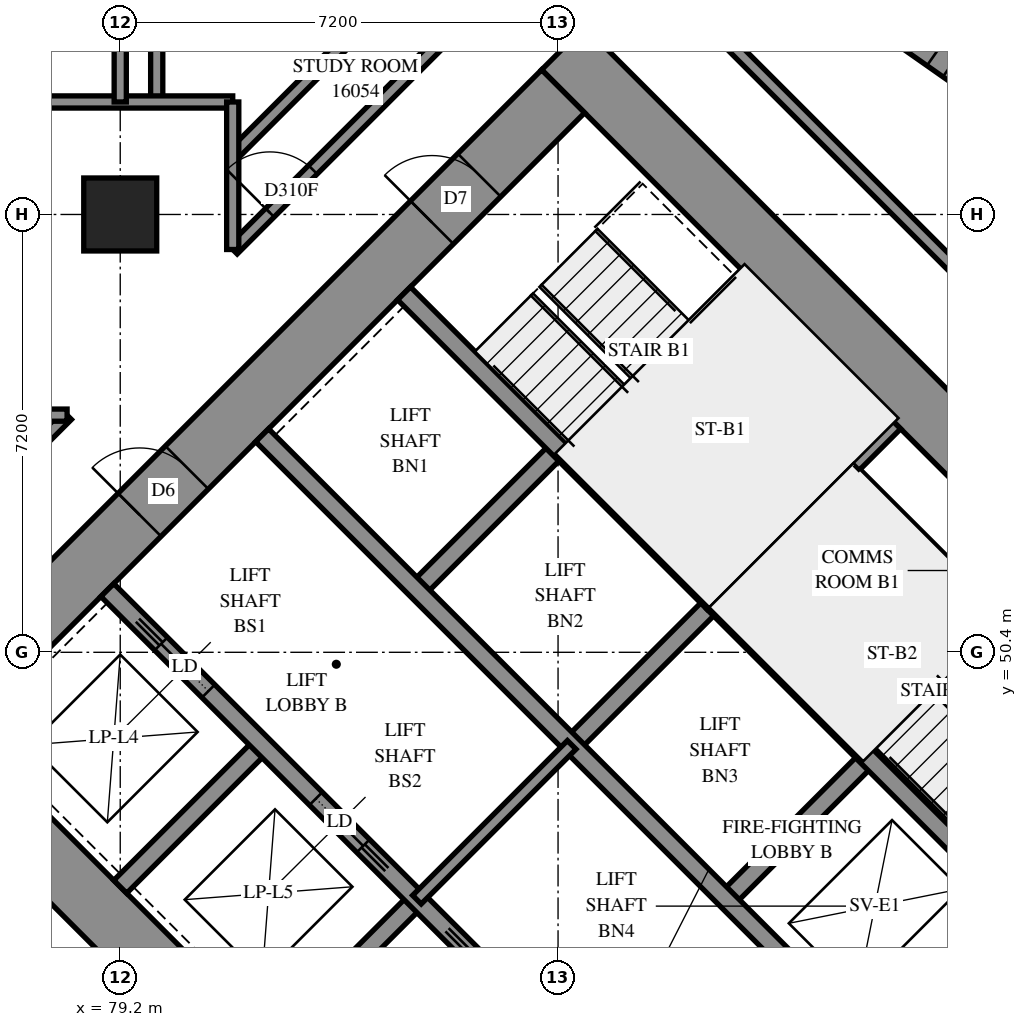
"""IFC4 building model, lengths in metres.
Left out: names, types, materials, properties, quantities, classifications, styles, units other than length and angle.
Written with IfcOpenShell. Run it as: python <this file> out.ifc"""

import sys

from ifc_helpers import new_model, si_unit, direction, frame, frame_2d, origin, origin_2d, place, context, subcontext, project, spatial, polyline, rectangle, outline, extrude, element, fill, save


model = new_model("IFC4")
c1 = context("Model", 3, precision=1e-05, world=origin(), true_north=direction((0.0, 1.0)))
c2 = subcontext(c1, "Body", "Model", "MODEL_VIEW")
j1 = project(units=[si_unit("LENGTHUNIT", "METRE"), si_unit("PLANEANGLEUNIT", "RADIAN")], contexts=[c1])
p1 = place(None, origin())
s1 = spatial("IfcSite", under=j1, at=p1, CompositionType="ELEMENT")
p2 = place(p1, origin())
s2 = spatial("IfcBuilding", under=s1, at=p2, CompositionType="ELEMENT")
p3 = place(p2, frame((0.0, 0.0, 61.0)))
s3 = spatial("IfcBuildingStorey", under=s2, at=p3, CompositionType="ELEMENT", Elevation=61.0)
p4 = place(p3, frame((79.2, 57.6, 0.0), z_axis=(0.0, 0.0, 1.0), x_axis=(1.0, 0.0, 0.0)))
e1 = element("IfcColumn", 1, at=p4, inside=s3, PredefinedType="COLUMN", context=c2, shape_type="SweptSolid", body=[
    extrude(rectangle(XDim=1.2, YDim=1.2, at=origin_2d()), origin(), (0.0, 0.0, 1.0), 3.1),
])
p5 = place(p3, frame((75.594, 49.443, -0.3), z_axis=(0.0, 0.0, 1.0), x_axis=(0.7071037324, -0.70710983, 0.0)))
e2 = element("IfcWall", 2, at=p5, inside=s3, PredefinedType="SHEAR", context=c2, shape_type="SweptSolid", body=[
    extrude(rectangle(XDim=16.4, YDim=1.0, at=frame_2d((8.2, 0.0))), origin(), (0.0, 0.0, 1.0), 2.7),
])
p6 = place(p3, frame((86.483, 60.333, -0.3), z_axis=(0.0, 0.0, 1.0), x_axis=(0.70710983, -0.7071037324, 0.0)))
e3 = element("IfcWall", 3, at=p6, inside=s3, PredefinedType="SHEAR", context=c2, shape_type="SweptSolid", body=[
    extrude(rectangle(XDim=16.4, YDim=1.0, at=frame_2d((8.2, 0.0))), origin(), (0.0, 0.0, 1.0), 2.7),
])
p7 = place(p6, frame((11.0, 0.0, 0.3)))
e4 = element("IfcOpeningElement", 4, at=p7, cuts=e3, PredefinedType="OPENING", context=c2, shape_type="SweptSolid", body=[
    extrude(rectangle(XDim=0.8, YDim=2.1, at=frame_2d((0.4, 1.05))), frame((0.0, 0.51, 0.0), z_axis=(0.0, -1.0, 0.0), x_axis=(1.0, 0.0, 0.0)), (0.0, 0.0, 1.0), 1.02),
])
p8 = place(p3, frame((76.301, 49.443, -0.3), z_axis=(0.0, 0.0, 1.0), x_axis=(0.7071067812, 0.7071067812, 0.0)))
e5 = element("IfcWall", 5, at=p8, inside=s3, PredefinedType="SHEAR", context=c2, shape_type="SweptSolid", body=[
    extrude(rectangle(XDim=14.4, YDim=1.0, at=frame_2d((7.2, 0.0))), origin(), (0.0, 0.0, 1.0), 2.7),
])
p9 = place(p8, frame((4.55, 0.0, 0.3)))
e6 = element("IfcOpeningElement", 6, at=p9, cuts=e5, PredefinedType="OPENING", context=c2, shape_type="SweptSolid", body=[
    extrude(rectangle(XDim=1.1, YDim=2.1, at=frame_2d((0.55, 1.05))), frame((0.0, 0.51, 0.0), z_axis=(0.0, -1.0, 0.0), x_axis=(1.0, 0.0, 0.0)), (0.0, 0.0, 1.0), 1.02),
])
p10 = place(p8, frame((11.35, 0.0, 0.3)))
e7 = element("IfcOpeningElement", 7, at=p10, cuts=e5, PredefinedType="OPENING", context=c2, shape_type="SweptSolid", body=[
    extrude(rectangle(XDim=1.1, YDim=2.1, at=frame_2d((0.55, 1.05))), frame((0.0, 0.51, 0.0), z_axis=(0.0, -1.0, 0.0), x_axis=(1.0, 0.0, 0.0)), (0.0, 0.0, 1.0), 1.02),
])
p11 = place(p3, frame((87.19, 38.554, -0.3), z_axis=(0.0, 0.0, 1.0), x_axis=(0.707103309, 0.7071102534, 0.0)))
e8 = element("IfcWall", 8, at=p11, inside=s3, PredefinedType="SHEAR", context=c2, shape_type="SweptSolid", body=[
    extrude(rectangle(XDim=14.4, YDim=1.0, at=frame_2d((7.2, 0.0))), origin(), (0.0, 0.0, 1.0), 2.7),
])
p12 = place(p11, frame((4.55, 0.0, 0.3)))
e9 = element("IfcOpeningElement", 9, at=p12, cuts=e8, PredefinedType="OPENING", context=c2, shape_type="SweptSolid", body=[
    extrude(rectangle(XDim=1.1, YDim=2.1, at=frame_2d((0.55, 1.05))), frame((0.0, 0.51, 0.0), z_axis=(0.0, -1.0, 0.0), x_axis=(1.0, 0.0, 0.0)), (0.0, 0.0, 1.0), 1.02),
])
p13 = place(p11, frame((11.35, 0.0, 0.3)))
e10 = element("IfcOpeningElement", 10, at=p13, cuts=e8, PredefinedType="OPENING", context=c2, shape_type="SweptSolid", body=[
    extrude(rectangle(XDim=1.1, YDim=2.1, at=frame_2d((0.55, 1.05))), frame((0.0, 0.51, 0.0), z_axis=(0.0, -1.0, 0.0), x_axis=(1.0, 0.0, 0.0)), (0.0, 0.0, 1.0), 1.02),
])
for number, where, z_axis, x_axis in (
    (11, (79.2, 46.544, 0.0), (0.0, 0.0, 1.0), (0.707, 0.707, 0.0)),
    (12, (84.079, 51.423, 0.0), (0.0, 0.0, 1.0), (0.707, 0.707, 0.0)),
):
    element("IfcWall", number, at=place(p3, frame(where, z_axis=z_axis, x_axis=x_axis)), inside=s3, PredefinedType="SOLIDWALL", context=c2, shape_type="SweptSolid", body=[
        extrude(rectangle(XDim=3.3, YDim=0.3, at=frame_2d((1.65, 0.0))), origin(), (0.0, 0.0, 1.0), 3.1),
    ])
p14 = place(p3, frame((81.746, 43.999, 0.0), z_axis=(0.0, 0.0, 1.0), x_axis=(0.7071067812, 0.7071067812, 0.0)))
e13 = element("IfcWall", 13, at=p14, inside=s3, PredefinedType="SOLIDWALL", context=c2, shape_type="SweptSolid", body=[
    extrude(rectangle(XDim=3.3, YDim=0.3, at=frame_2d((1.65, 0.0))), origin(), (0.0, 0.0, 1.0), 3.1),
])
for number, where, z_axis, x_axis in (
    (14, (86.625, 48.878, 0.0), (0.0, 0.0, 1.0), (0.707, 0.707, 0.0)),
    (15, (89.17, 46.332, 0.0), (0.0, 0.0, 1.0), (0.707, 0.707, 0.0)),
):
    element("IfcWall", number, at=place(p3, frame(where, z_axis=z_axis, x_axis=x_axis)), inside=s3, PredefinedType="SOLIDWALL", context=c2, shape_type="SweptSolid", body=[
        extrude(rectangle(XDim=3.3, YDim=0.3, at=frame_2d((1.65, 0.0))), origin(), (0.0, 0.0, 1.0), 3.1),
    ])
p15 = place(p3, frame((78.988, 51.423, 0.0), z_axis=(0.0, 0.0, 1.0), x_axis=(0.7071067812, -0.7071067812, 0.0)))
e16 = element("IfcWall", 16, at=p15, inside=s3, PredefinedType="SOLIDWALL", context=c2, shape_type="SweptSolid", body=[
    extrude(rectangle(XDim=14.4, YDim=0.3, at=frame_2d((7.2, 0.0))), origin(), (0.0, 0.0, 1.0), 3.1),
])
p16 = place(p15, frame((1.25, 0.0, 0.0)))
e17 = element("IfcOpeningElement", 17, at=p16, cuts=e16, PredefinedType="OPENING", context=c2, shape_type="SweptSolid", body=[
    extrude(rectangle(XDim=1.1, YDim=2.1, at=frame_2d((0.55, 1.05))), frame((0.0, 0.16, 0.0), z_axis=(0.0, -1.0, 0.0), x_axis=(1.0, 0.0, 0.0)), (0.0, 0.0, 1.0), 0.32),
])
p17 = place(p15, frame((4.85, 0.0, 0.0)))
e18 = element("IfcOpeningElement", 18, at=p17, cuts=e16, PredefinedType="OPENING", context=c2, shape_type="SweptSolid", body=[
    extrude(rectangle(XDim=1.1, YDim=2.1, at=frame_2d((0.55, 1.05))), frame((0.0, 0.16, 0.0), z_axis=(0.0, -1.0, 0.0), x_axis=(1.0, 0.0, 0.0)), (0.0, 0.0, 1.0), 0.32),
])
p18 = place(p15, frame((8.45, 0.0, 0.0)))
e19 = element("IfcOpeningElement", 19, at=p18, cuts=e16, PredefinedType="OPENING", context=c2, shape_type="SweptSolid", body=[
    extrude(rectangle(XDim=1.1, YDim=2.1, at=frame_2d((0.55, 1.05))), frame((0.0, 0.16, 0.0), z_axis=(0.0, -1.0, 0.0), x_axis=(1.0, 0.0, 0.0)), (0.0, 0.0, 1.0), 0.32),
])
p19 = place(p15, frame((12.05, 0.0, 0.0)))
e20 = element("IfcOpeningElement", 20, at=p19, cuts=e16, PredefinedType="OPENING", context=c2, shape_type="SweptSolid", body=[
    extrude(rectangle(XDim=1.1, YDim=2.1, at=frame_2d((0.55, 1.05))), frame((0.0, 0.16, 0.0), z_axis=(0.0, -1.0, 0.0), x_axis=(1.0, 0.0, 0.0)), (0.0, 0.0, 1.0), 0.32),
])
p20 = place(p3, frame((81.534, 53.969, 0.0), z_axis=(0.0, 0.0, 1.0), x_axis=(0.707103309, -0.7071102534, 0.0)))
e21 = element("IfcWall", 21, at=p20, inside=s3, PredefinedType="SOLIDWALL", context=c2, shape_type="SweptSolid", body=[
    extrude(rectangle(XDim=14.4, YDim=0.3, at=frame_2d((7.2, 0.0))), origin(), (0.0, 0.0, 1.0), 3.1),
])
p21 = place(p20, frame((12.05, 0.0, 0.0)))
e22 = element("IfcOpeningElement", 22, at=p21, cuts=e21, PredefinedType="OPENING", context=c2, shape_type="SweptSolid", body=[
    extrude(rectangle(XDim=1.1, YDim=2.1, at=frame_2d((0.55, 1.05))), frame((0.0, 0.16, 0.0), z_axis=(0.0, -1.0, 0.0), x_axis=(1.0, 0.0, 0.0)), (0.0, 0.0, 1.0), 0.32),
])
for number, where, z_axis, x_axis in (
    (23, (83.867, 56.302, 0.0), (0.0, 0.0, 1.0), (0.707, -0.707, 0.0)),
    (24, (88.958, 51.211, 0.0), (0.0, 0.0, 1.0), (0.707, -0.707, 0.0)),
):
    element("IfcWall", number, at=place(p3, frame(where, z_axis=z_axis, x_axis=x_axis)), inside=s3, PredefinedType="SOLIDWALL", context=c2, shape_type="SweptSolid", body=[
        extrude(rectangle(XDim=7.2, YDim=0.3, at=frame_2d((3.6, 0.0))), origin(), (0.0, 0.0, 1.0), 3.1),
    ])
p22 = place(p3, frame((88.958, 51.211, 0.0), z_axis=(0.0, 0.0, 1.0), x_axis=(0.7071067812, 0.7071067812, 0.0)))
e25 = element("IfcWall", 25, at=p22, inside=s3, PredefinedType="SOLIDWALL", context=c2, shape_type="SweptSolid", body=[
    extrude(rectangle(XDim=4.2, YDim=0.3, at=frame_2d((2.1, 0.0))), origin(), (0.0, 0.0, 1.0), 3.1),
])
p23 = place(p3, frame((94.156, 59.199, 0.0), z_axis=(0.0, 0.0, 1.0), x_axis=(-0.8186472188, 0.5742967275, 0.0)))
e26 = element("IfcWall", 26, at=p23, inside=s3, PredefinedType="SOLIDWALL", context=c2, shape_type="SweptSolid", body=[
    extrude(outline(polyline([(-0.048, -0.275), (3.442, -0.275), (3.538, 0.275), (0.048, 0.275), (-0.048, -0.275)])), origin(), (0.0, 0.0, 1.0), 3.1),
])
p24 = place(p23, frame((0.35, 0.0, 0.5)))
e27 = element("IfcOpeningElement", 27, at=p24, cuts=e26, PredefinedType="OPENING", context=c2, shape_type="SweptSolid", body=[
    extrude(rectangle(XDim=1.2, YDim=2.45, at=frame_2d((0.6, 1.225))), frame((0.0, 0.285, 0.0), z_axis=(0.0, -1.0, 0.0), x_axis=(1.0, 0.0, 0.0)), (0.0, 0.0, 1.0), 0.57),
])
p25 = place(p23, frame((1.871, 0.0, 0.5)))
e28 = element("IfcOpeningElement", 28, at=p25, cuts=e26, PredefinedType="OPENING", context=c2, shape_type="SweptSolid", body=[
    extrude(rectangle(XDim=1.2, YDim=2.45, at=frame_2d((0.6, 1.225))), frame((0.0, 0.285, 0.0), z_axis=(0.0, -1.0, 0.0), x_axis=(1.0, 0.0, 0.0)), (0.0, 0.0, 1.0), 0.57),
])
p26 = place(p3, frame((91.313, 53.354, 0.0), z_axis=(0.0, 0.0, 1.0), x_axis=(0.7071067812, -0.7071067812, 0.0)))
e29 = element("IfcWall", 29, at=p26, inside=s3, PredefinedType="PARTITIONING", context=c2, shape_type="SweptSolid", body=[
    extrude(rectangle(XDim=5.65, YDim=0.15, at=frame_2d((2.825, 0.0))), origin(), (0.0, 0.0, 1.0), 3.1),
])
p27 = place(p3, frame((84.079, 46.332, 0.0), z_axis=(0.0, 0.0, 1.0), x_axis=(0.7071067812, 0.7071067812, 0.0)))
e30 = element("IfcWall", 30, at=p27, inside=s3, PredefinedType="PARTITIONING", context=c2, shape_type="SweptSolid", body=[
    extrude(rectangle(XDim=3.6, YDim=0.2, at=frame_2d((1.8, 0.0))), origin(), (0.0, 0.0, 1.0), 3.1),
])
p28 = place(p3, frame((86.833, 62.805, 0.0), z_axis=(0.0, 0.0, 1.0), x_axis=(0.7072045138, -0.7070090351, 0.0)))
e31 = element("IfcWall", 31, at=p28, inside=s3, PredefinedType="PARTITIONING", context=c2, shape_type="SweptSolid", body=[
    extrude(rectangle(XDim=13.301, YDim=0.2, at=frame_2d((6.65, 0.0))), origin(), (0.0, 0.0, 1.0), 3.1),
])
p29 = place(p28, frame((10.586, 0.0, 0.0)))
e32 = element("IfcOpeningElement", 32, at=p29, cuts=e31, PredefinedType="OPENING", context=c2, shape_type="SweptSolid", body=[
    extrude(rectangle(XDim=1.0, YDim=2.1, at=frame_2d((0.5, 1.05))), frame((0.0, 0.11, 0.0), z_axis=(0.0, -1.0, 0.0), x_axis=(1.0, 0.0, 0.0)), (0.0, 0.0, 1.0), 0.22),
])
p30 = place(p3, frame((81.049, 58.577, 0.0), z_axis=(0.0, 0.0, 1.0), x_axis=(0.7071067812, 0.7071067812, 0.0)))
e33 = element("IfcWall", 33, at=p30, inside=s3, PredefinedType="PARTITIONING", context=c2, shape_type="SweptSolid", body=[
    extrude(rectangle(XDim=9.086, YDim=0.2, at=frame_2d((4.543, 0.0))), origin(), (0.0, 0.0, 1.0), 3.1),
])
p31 = place(p3, frame((81.053, 57.021, 0.0), z_axis=(0.0, 0.0, 1.0), x_axis=(0.7069845395, 0.7072290017, 0.0)))
e34 = element("IfcWall", 34, at=p31, inside=s3, PredefinedType="PARTITIONING", context=c2, shape_type="SweptSolid", body=[
    extrude(rectangle(XDim=8.181, YDim=0.2, at=frame_2d((4.091, 0.0))), origin(), (0.0, 0.0, 1.0), 3.1),
])
p32 = place(p31, frame((0.86, 0.0, 0.0)))
e35 = element("IfcOpeningElement", 35, at=p32, cuts=e34, PredefinedType="OPENING", context=c2, shape_type="SweptSolid", body=[
    extrude(rectangle(XDim=1.0, YDim=2.1, at=frame_2d((0.5, 1.05))), frame((0.0, 0.11, 0.0), z_axis=(0.0, -1.0, 0.0), x_axis=(1.0, 0.0, 0.0)), (0.0, 0.0, 1.0), 0.22),
])
p33 = place(p3, frame((74.699, 50.671, 0.0), z_axis=(0.0, 0.0, 1.0), x_axis=(0.7071067812, 0.7071067812, 0.0)))
e36 = element("IfcWall", 36, at=p33, inside=s3, PredefinedType="PARTITIONING", context=c2, shape_type="SweptSolid", body=[
    extrude(rectangle(XDim=5.131, YDim=0.2, at=frame_2d((2.565, 0.0))), origin(), (0.0, 0.0, 1.0), 3.1),
])
p34 = place(p3, frame((79.8, 59.45, 0.0), z_axis=(0.0, 0.0, 1.0), x_axis=(0.0, 1.0, 0.0)))
e37 = element("IfcWall", 37, at=p34, inside=s3, PredefinedType="PARTITIONING", context=c2, shape_type="SweptSolid", body=[
    extrude(rectangle(XDim=4.75, YDim=0.2, at=frame_2d((2.375, 0.0))), origin(), (0.0, 0.0, 1.0), 3.1),
])
p35 = place(p3, frame((74.502, 54.3, 0.0), z_axis=(0.0, 0.0, 1.0), x_axis=(1.0, 0.0, 0.0)))
e38 = element("IfcWall", 38, at=p35, inside=s3, PredefinedType="PARTITIONING", context=c2, shape_type="SweptSolid", body=[
    extrude(rectangle(XDim=3.824, YDim=0.2, at=frame_2d((1.912, 0.0))), origin(), (0.0, 0.0, 1.0), 3.1),
])
p36 = place(p35, frame((0.55, 0.0, 0.0)))
e39 = element("IfcOpeningElement", 39, at=p36, cuts=e38, PredefinedType="OPENING", context=c2, shape_type="SweptSolid", body=[
    extrude(rectangle(XDim=1.0, YDim=2.1, at=frame_2d((0.5, 1.05))), frame((0.0, 0.11, 0.0), z_axis=(0.0, -1.0, 0.0), x_axis=(1.0, 0.0, 0.0)), (0.0, 0.0, 1.0), 0.22),
])
p37 = place(p3, frame((77.352, 59.45, 0.0), z_axis=(0.0, 0.0, 1.0), x_axis=(1.0, 0.0, 0.0)))
e40 = element("IfcWall", 40, at=p37, inside=s3, PredefinedType="PARTITIONING", context=c2, shape_type="SweptSolid", body=[
    extrude(rectangle(XDim=3.698, YDim=0.2, at=frame_2d((1.849, 0.0))), origin(), (0.0, 0.0, 1.0), 3.1),
])
p38 = place(p3, frame((81.05, 57.024, 0.0), z_axis=(0.0, 0.0, 1.0), x_axis=(0.0, 1.0, 0.0)))
e41 = element("IfcWall", 41, at=p38, inside=s3, PredefinedType="PARTITIONING", context=c2, shape_type="SweptSolid", body=[
    extrude(rectangle(XDim=2.426, YDim=0.2, at=frame_2d((1.213, 0.0))), origin(), (0.0, 0.0, 1.0), 3.1),
])
p39 = place(p3, frame((79.2, 59.45, 0.0), z_axis=(0.0, 0.0, 1.0), x_axis=(0.0, 1.0, 0.0)))
e42 = element("IfcWall", 42, at=p39, inside=s3, PredefinedType="PARTITIONING", context=c2, shape_type="SweptSolid", body=[
    extrude(rectangle(XDim=2.05, YDim=0.2, at=frame_2d((1.025, 0.0))), origin(), (0.0, 0.0, 1.0), 3.1),
])
p40 = place(p24, origin())
e43 = element("IfcWindow", 43, at=p40, inside=s3, PartitioningType="SINGLE_PANEL", PredefinedType="WINDOW", context=c2, shape_type="SweptSolid", body=[
    extrude(rectangle(XDim=1.2, YDim=2.45, at=frame_2d((0.6, 1.225))), frame((0.0, 0.155, 0.0), z_axis=(0.0, -1.0, 0.0), x_axis=(1.0, 0.0, 0.0)), (0.0, 0.0, 1.0), 0.06),
])
fill(e27, e43)
p41 = place(p25, origin())
e44 = element("IfcWindow", 44, at=p41, inside=s3, PartitioningType="SINGLE_PANEL", PredefinedType="WINDOW", context=c2, shape_type="SweptSolid", body=[
    extrude(rectangle(XDim=1.2, YDim=2.45, at=frame_2d((0.6, 1.225))), frame((0.0, 0.155, 0.0), z_axis=(0.0, -1.0, 0.0), x_axis=(1.0, 0.0, 0.0)), (0.0, 0.0, 1.0), 0.06),
])
fill(e28, e44)
p42 = place(p9, origin())
e45 = element("IfcDoor", 45, at=p42, inside=s3, OperationType="DOUBLE_DOOR_SINGLE_SWING", PredefinedType="DOOR", context=c2, shape_type="SweptSolid", body=[
    extrude(rectangle(XDim=1.1, YDim=2.1, at=frame_2d((0.55, 1.05))), frame((0.0, 0.025, 0.0), z_axis=(0.0, -1.0, 0.0), x_axis=(1.0, 0.0, 0.0)), (0.0, 0.0, 1.0), 0.05),
])
fill(e6, e45)
p43 = place(p10, origin())
e46 = element("IfcDoor", 46, at=p43, inside=s3, OperationType="SINGLE_SWING_LEFT", PredefinedType="DOOR", context=c2, shape_type="SweptSolid", body=[
    extrude(rectangle(XDim=1.1, YDim=2.1, at=frame_2d((0.55, 1.05))), frame((0.0, 0.025, 0.0), z_axis=(0.0, -1.0, 0.0), x_axis=(1.0, 0.0, 0.0)), (0.0, 0.0, 1.0), 0.05),
])
fill(e7, e46)
p44 = place(p16, origin())
e47 = element("IfcDoor", 47, at=p44, inside=s3, OperationType="SLIDING_TO_LEFT", PredefinedType="DOOR", context=c2, shape_type="SweptSolid", body=[
    extrude(rectangle(XDim=1.1, YDim=2.1, at=frame_2d((0.55, 1.05))), frame((0.0, 0.025, 0.0), z_axis=(0.0, -1.0, 0.0), x_axis=(1.0, 0.0, 0.0)), (0.0, 0.0, 1.0), 0.05),
])
fill(e17, e47)
p45 = place(p17, origin())
e48 = element("IfcDoor", 48, at=p45, inside=s3, OperationType="SLIDING_TO_RIGHT", PredefinedType="DOOR", context=c2, shape_type="SweptSolid", body=[
    extrude(rectangle(XDim=1.1, YDim=2.1, at=frame_2d((0.55, 1.05))), frame((0.0, 0.025, 0.0), z_axis=(0.0, -1.0, 0.0), x_axis=(1.0, 0.0, 0.0)), (0.0, 0.0, 1.0), 0.05),
])
fill(e18, e48)
p46 = place(p32, origin())
e49 = element("IfcDoor", 49, at=p46, inside=s3, OperationType="SINGLE_SWING_RIGHT", PredefinedType="DOOR", context=c2, shape_type="SweptSolid", body=[
    extrude(rectangle(XDim=1.0, YDim=2.1, at=frame_2d((0.5, 1.05))), frame((0.0, 0.025, 0.0), z_axis=(0.0, -1.0, 0.0), x_axis=(1.0, 0.0, 0.0)), (0.0, 0.0, 1.0), 0.05),
])
fill(e35, e49)
save(model, sys.argv[1])
